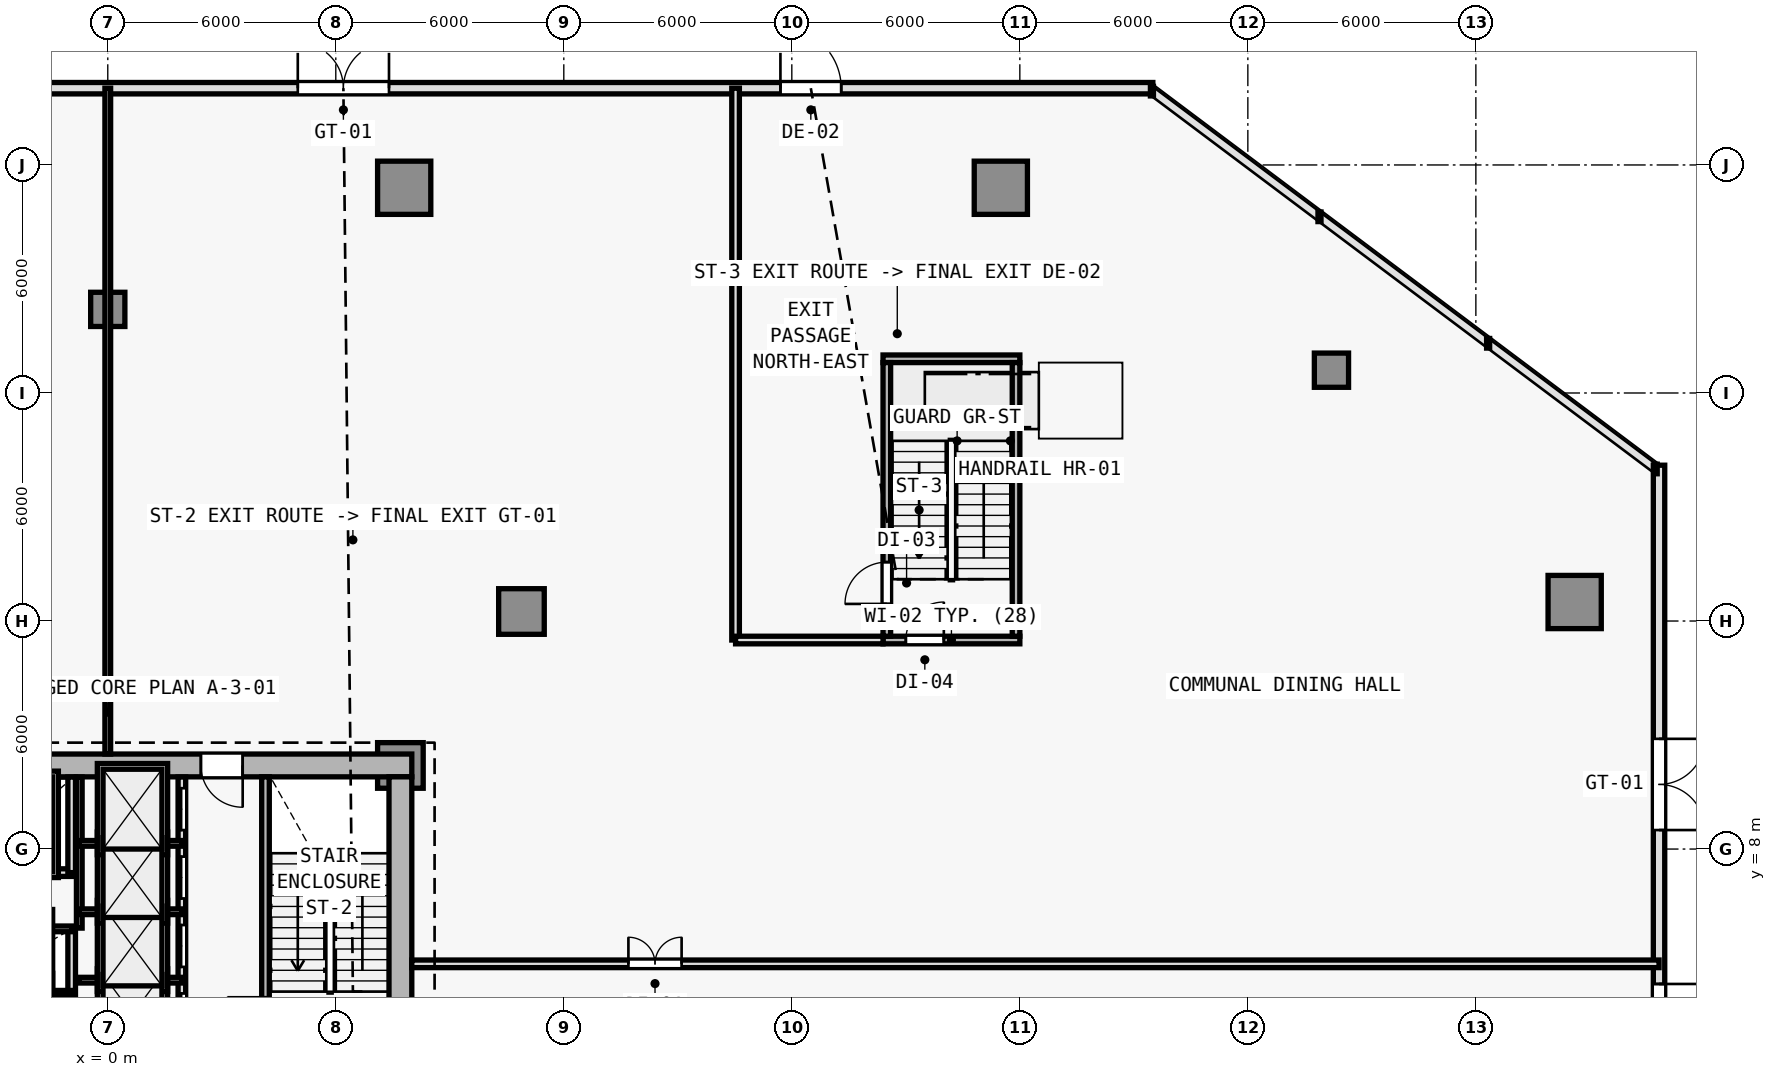
"""IFC4 building model, lengths in metres.
Left out: names, types, materials, properties, quantities, classifications, styles, units other than length and angle.
Written with IfcOpenShell. Run it as: python <this file> out.ifc"""

import sys

from ifc_helpers import new_model, si_unit, direction, frame, frame_2d, origin, origin_2d, place, context, subcontext, project, spatial, rectangle, extrude, element, fill, save


model = new_model("IFC4")
c1 = context("Model", 3, precision=1e-05, world=origin(), true_north=direction((0.0, 1.0)))
c2 = subcontext(c1, "Body", "Model", "MODEL_VIEW")
j1 = project(units=[si_unit("LENGTHUNIT", "METRE"), si_unit("PLANEANGLEUNIT", "RADIAN")], contexts=[c1])
p1 = place(None, origin())
s1 = spatial("IfcSite", under=j1, at=p1, CompositionType="ELEMENT")
p2 = place(p1, origin())
s2 = spatial("IfcBuilding", under=s1, at=p2, CompositionType="ELEMENT")
p3 = place(p2, origin())
s3 = spatial("IfcBuildingStorey", under=s2, at=p3, CompositionType="ELEMENT", Elevation=0.0)
p4 = place(p3, frame((7.7, 10.2, 0.0), z_axis=(0.0, 0.0, 1.0), x_axis=(1.0, 0.0, 0.0)))
e1 = element("IfcColumn", 1, at=p4, inside=s3, PredefinedType="COLUMN", context=c2, shape_type="SweptSolid", body=[
    extrude(rectangle(XDim=1.2, YDim=1.2, at=origin_2d()), origin(), (0.0, 0.0, 1.0), 5.0),
])
for number, where, z_axis, x_axis in (
    (2, (38.6, 14.5, 0.0), (0.0, 0.0, 1.0), (1.0, 0.0, 0.0)),
    (3, (23.5, 25.4, 0.0), (0.0, 0.0, 1.0), (1.0, 0.0, 0.0)),
    (4, (7.8, 25.4, 0.0), (0.0, 0.0, 1.0), (1.0, 0.0, 0.0)),
):
    element("IfcColumn", number, at=place(p3, frame(where, z_axis=z_axis, x_axis=x_axis)), inside=s3, PredefinedType="COLUMN", context=c2, shape_type="SweptSolid", body=[
        extrude(rectangle(XDim=1.4, YDim=1.4, at=origin_2d()), origin(), (0.0, 0.0, 1.0), 5.0),
    ])
p5 = place(p3, frame((10.885, 14.25, 0.0), z_axis=(0.0, 0.0, 1.0), x_axis=(1.0, 0.0, 0.0)))
e5 = element("IfcColumn", 5, at=p5, inside=s3, PredefinedType="COLUMN", context=c2, shape_type="SweptSolid", body=[
    extrude(rectangle(XDim=1.2, YDim=1.2, at=origin_2d()), origin(), (0.0, 0.0, 1.0), 5.0),
])
for number, where, z_axis, x_axis in (
    (6, (32.2, 20.6, 0.0), (0.0, 0.0, 1.0), (1.0, 0.0, 0.0)),
    (7, (0.0, 22.2, 0.0), (0.0, 0.0, 1.0), (1.0, 0.0, 0.0)),
):
    element("IfcColumn", number, at=place(p3, frame(where, z_axis=z_axis, x_axis=x_axis)), inside=s3, PredefinedType="COLUMN", context=c2, shape_type="SweptSolid", body=[
        extrude(rectangle(XDim=0.9, YDim=0.9, at=origin_2d()), origin(), (0.0, 0.0, 1.0), 5.0),
    ])
p6 = place(p3, frame((40.82, 18.1, 0.0), z_axis=(0.0, 0.0, 1.0), x_axis=(0.0, -1.0, 0.0)))
e8 = element("IfcWall", 8, at=p6, inside=s3, PredefinedType="SOLIDWALL", context=c2, shape_type="SweptSolid", body=[
    extrude(rectangle(XDim=39.8, YDim=0.3, at=frame_2d((19.9, 0.0))), origin(), (0.0, 0.0, 1.0), 4.72),
])
p7 = place(p6, frame((25.2, 0.0, 0.0)))
e9 = element("IfcOpeningElement", 9, at=p7, cuts=e8, PredefinedType="OPENING", context=c2, shape_type="SweptSolid", body=[
    extrude(rectangle(XDim=2.4, YDim=2.4, at=frame_2d((1.2, 1.2))), frame((0.0, 0.16, 0.0), z_axis=(0.0, -1.0, 0.0), x_axis=(1.0, 0.0, 0.0)), (0.0, 0.0, 1.0), 0.32),
])
p8 = place(p6, frame((13.65, 0.0, 0.0)))
e10 = element("IfcOpeningElement", 10, at=p8, cuts=e8, PredefinedType="OPENING", context=c2, shape_type="SweptSolid", body=[
    extrude(rectangle(XDim=1.6, YDim=2.3, at=frame_2d((0.8, 1.15))), frame((0.0, 0.16, 0.0), z_axis=(0.0, -1.0, 0.0), x_axis=(1.0, 0.0, 0.0)), (0.0, 0.0, 1.0), 0.32),
])
p9 = place(p6, frame((7.2, 0.0, 0.0)))
e11 = element("IfcOpeningElement", 11, at=p9, cuts=e8, PredefinedType="OPENING", context=c2, shape_type="SweptSolid", body=[
    extrude(rectangle(XDim=2.4, YDim=2.4, at=frame_2d((1.2, 1.2))), frame((0.0, 0.16, 0.0), z_axis=(0.0, -1.0, 0.0), x_axis=(1.0, 0.0, 0.0)), (0.0, 0.0, 1.0), 0.32),
])
p10 = place(p3, frame((-27.5, 28.02, 0.0), z_axis=(0.0, 0.0, 1.0), x_axis=(1.0, 0.0, 0.0)))
e12 = element("IfcWall", 12, at=p10, inside=s3, PredefinedType="SOLIDWALL", context=c2, shape_type="SweptSolid", body=[
    extrude(rectangle(XDim=55.0, YDim=0.3, at=frame_2d((27.5, 0.0))), origin(), (0.0, 0.0, 1.0), 4.72),
])
p11 = place(p10, frame((45.2, 0.0, 0.0)))
e13 = element("IfcOpeningElement", 13, at=p11, cuts=e12, PredefinedType="OPENING", context=c2, shape_type="SweptSolid", body=[
    extrude(rectangle(XDim=1.6, YDim=2.3, at=frame_2d((0.8, 1.15))), frame((0.0, 0.16, 0.0), z_axis=(0.0, -1.0, 0.0), x_axis=(1.0, 0.0, 0.0)), (0.0, 0.0, 1.0), 0.32),
])
p12 = place(p10, frame((32.5, 0.0, 0.0)))
e14 = element("IfcOpeningElement", 14, at=p12, cuts=e12, PredefinedType="OPENING", context=c2, shape_type="SweptSolid", body=[
    extrude(rectangle(XDim=2.4, YDim=2.4, at=frame_2d((1.2, 1.2))), frame((0.0, 0.16, 0.0), z_axis=(0.0, -1.0, 0.0), x_axis=(1.0, 0.0, 0.0)), (0.0, 0.0, 1.0), 0.32),
])
p13 = place(p10, frame((20.7, 0.0, 0.0)))
e15 = element("IfcOpeningElement", 15, at=p13, cuts=e12, PredefinedType="OPENING", context=c2, shape_type="SweptSolid", body=[
    extrude(rectangle(XDim=1.6, YDim=2.3, at=frame_2d((0.8, 1.15))), frame((0.0, 0.16, 0.0), z_axis=(0.0, -1.0, 0.0), x_axis=(1.0, 0.0, 0.0)), (0.0, 0.0, 1.0), 0.32),
])
p14 = place(p3, frame((8.0, 10.2, 0.0), z_axis=(0.0, 0.0, 1.0), x_axis=(-1.0, 0.0, 0.0)))
e16 = element("IfcWall", 16, at=p14, inside=s3, PredefinedType="SHEAR", context=c2, shape_type="SweptSolid", body=[
    extrude(rectangle(XDim=16.0, YDim=0.6, at=frame_2d((8.0, 0.0))), origin(), (0.0, 0.0, 1.0), 4.72),
])
p15 = place(p14, frame((4.45, 0.0, 0.0)))
e17 = element("IfcOpeningElement", 17, at=p15, cuts=e16, PredefinedType="OPENING", context=c2, shape_type="SweptSolid", body=[
    extrude(rectangle(XDim=1.1, YDim=2.15, at=frame_2d((0.55, 1.075))), frame((0.0, 0.31, 0.0), z_axis=(0.0, -1.0, 0.0), x_axis=(1.0, 0.0, 0.0)), (0.0, 0.0, 1.0), 0.62),
])
p16 = place(p3, frame((7.7, 9.9, 0.0), z_axis=(0.0, 0.0, 1.0), x_axis=(0.0, -1.0, 0.0)))
e18 = element("IfcWall", 18, at=p16, inside=s3, PredefinedType="SHEAR", context=c2, shape_type="SweptSolid", body=[
    extrude(rectangle(XDim=19.0, YDim=0.6, at=frame_2d((9.5, 0.0))), origin(), (0.0, 0.0, 1.0), 4.72),
])
p17 = place(p16, frame((5.95, 0.0, 0.0)))
e19 = element("IfcOpeningElement", 19, at=p17, cuts=e18, PredefinedType="OPENING", context=c2, shape_type="SweptSolid", body=[
    extrude(rectangle(XDim=1.1, YDim=2.15, at=frame_2d((0.55, 1.075))), frame((0.0, 0.31, 0.0), z_axis=(0.0, -1.0, 0.0), x_axis=(1.0, 0.0, 0.0)), (0.0, 0.0, 1.0), 0.62),
])
p18 = place(p3, frame((4.15, 2.75, 0.0), z_axis=(0.0, 0.0, 1.0), x_axis=(0.0, 1.0, 0.0)))
e20 = element("IfcWall", 20, at=p18, inside=s3, PredefinedType="SOLIDWALL", context=c2, shape_type="SweptSolid", body=[
    extrude(rectangle(XDim=7.15, YDim=0.2, at=frame_2d((3.575, 0.0))), origin(), (0.0, 0.0, 1.0), 4.72),
])
p19 = place(p18, frame((0.35, 0.0, 0.0)))
e21 = element("IfcOpeningElement", 21, at=p19, cuts=e20, PredefinedType="OPENING", context=c2, shape_type="SweptSolid", body=[
    extrude(rectangle(XDim=1.0, YDim=2.15, at=frame_2d((0.5, 1.075))), frame((0.0, 0.11, 0.0), z_axis=(0.0, -1.0, 0.0), x_axis=(1.0, 0.0, 0.0)), (0.0, 0.0, 1.0), 0.22),
])
p20 = place(p3, frame((-0.95, 2.65, 0.0), z_axis=(0.0, 0.0, 1.0), x_axis=(0.0, 1.0, 0.0)))
e22 = element("IfcWall", 22, at=p20, inside=s3, PredefinedType="SOLIDWALL", context=c2, shape_type="SweptSolid", body=[
    extrude(rectangle(XDim=3.27, YDim=0.2, at=frame_2d((1.635, 0.0))), origin(), (0.0, 0.0, 1.0), 4.72),
])
p21 = place(p3, frame((-3.85, 4.22, 0.0), z_axis=(0.0, 0.0, 1.0), x_axis=(1.0, 0.0, 0.0)))
e23 = element("IfcWall", 23, at=p21, inside=s3, PredefinedType="PARTITIONING", context=c2, shape_type="SweptSolid", body=[
    extrude(rectangle(XDim=2.9, YDim=0.12, at=frame_2d((1.45, 0.0))), origin(), (0.0, 0.0, 1.0), 4.72),
])
p22 = place(p3, frame((-3.85, 5.9, 0.0), z_axis=(0.0, 0.0, 1.0), x_axis=(1.0, 0.0, 0.0)))
e24 = element("IfcWall", 24, at=p22, inside=s3, PredefinedType="PARTITIONING", context=c2, shape_type="SweptSolid", body=[
    extrude(rectangle(XDim=2.9, YDim=0.15, at=frame_2d((1.45, 0.0))), origin(), (0.0, 0.0, 1.0), 4.72),
])
p23 = place(p3, frame((-3.85, 7.38, 0.0), z_axis=(0.0, 0.0, 1.0), x_axis=(1.0, 0.0, 0.0)))
e25 = element("IfcWall", 25, at=p23, inside=s3, PredefinedType="SOLIDWALL", context=c2, shape_type="SweptSolid", body=[
    extrude(rectangle(XDim=2.9, YDim=0.2, at=frame_2d((1.45, 0.0))), origin(), (0.0, 0.0, 1.0), 4.72),
])
p24 = place(p23, frame((0.85, 0.0, 0.0)))
e26 = element("IfcOpeningElement", 26, at=p24, cuts=e25, PredefinedType="OPENING", context=c2, shape_type="SweptSolid", body=[
    extrude(rectangle(XDim=1.2, YDim=2.2, at=frame_2d((0.6, 1.1))), frame((0.0, 0.11, 0.0), z_axis=(0.0, -1.0, 0.0), x_axis=(1.0, 0.0, 0.0)), (0.0, 0.0, 1.0), 0.22),
])
p25 = place(p3, frame((-0.95, 7.38, 0.0), z_axis=(0.0, 0.0, 1.0), x_axis=(0.0, 1.0, 0.0)))
e27 = element("IfcWall", 27, at=p25, inside=s3, PredefinedType="SOLIDWALL", context=c2, shape_type="SweptSolid", body=[
    extrude(rectangle(XDim=2.515, YDim=0.2, at=frame_2d((1.258, 0.0))), origin(), (0.0, 0.0, 1.0), 4.72),
])
p26 = place(p3, frame((1.95, 2.65, 0.0), z_axis=(0.0, 0.0, 1.0), x_axis=(0.0, 1.0, 0.0)))
e28 = element("IfcWall", 28, at=p26, inside=s3, PredefinedType="SOLIDWALL", context=c2, shape_type="SweptSolid", body=[
    extrude(rectangle(XDim=7.245, YDim=0.2, at=frame_2d((3.623, 0.0))), origin(), (0.0, 0.0, 1.0), 4.72),
])
p27 = place(p26, frame((0.45, 0.0, 0.0)))
e29 = element("IfcOpeningElement", 29, at=p27, cuts=e28, PredefinedType="OPENING", context=c2, shape_type="SweptSolid", body=[
    extrude(rectangle(XDim=1.1, YDim=2.15, at=frame_2d((0.55, 1.075))), frame((0.0, 0.11, 0.0), z_axis=(0.0, -1.0, 0.0), x_axis=(1.0, 0.0, 0.0)), (0.0, 0.0, 1.0), 0.22),
])
p28 = place(p26, frame((2.25, 0.0, 0.0)))
e30 = element("IfcOpeningElement", 30, at=p28, cuts=e28, PredefinedType="OPENING", context=c2, shape_type="SweptSolid", body=[
    extrude(rectangle(XDim=1.1, YDim=2.15, at=frame_2d((0.55, 1.075))), frame((0.0, 0.11, 0.0), z_axis=(0.0, -1.0, 0.0), x_axis=(1.0, 0.0, 0.0)), (0.0, 0.0, 1.0), 0.22),
])
p29 = place(p26, frame((4.05, 0.0, 0.0)))
e31 = element("IfcOpeningElement", 31, at=p29, cuts=e28, PredefinedType="OPENING", context=c2, shape_type="SweptSolid", body=[
    extrude(rectangle(XDim=1.1, YDim=2.15, at=frame_2d((0.55, 1.075))), frame((0.0, 0.11, 0.0), z_axis=(0.0, -1.0, 0.0), x_axis=(1.0, 0.0, 0.0)), (0.0, 0.0, 1.0), 0.22),
])
p30 = place(p26, frame((5.85, 0.0, 0.0)))
e32 = element("IfcOpeningElement", 32, at=p30, cuts=e28, PredefinedType="OPENING", context=c2, shape_type="SweptSolid", body=[
    extrude(rectangle(XDim=1.1, YDim=2.15, at=frame_2d((0.55, 1.075))), frame((0.0, 0.11, 0.0), z_axis=(0.0, -1.0, 0.0), x_axis=(1.0, 0.0, 0.0)), (0.0, 0.0, 1.0), 0.22),
])
p31 = place(p3, frame((-0.75, 5.92, 0.0), z_axis=(0.0, 0.0, 1.0), x_axis=(0.0, 1.0, 0.0)))
e33 = element("IfcWall", 33, at=p31, inside=s3, PredefinedType="PARTITIONING", context=c2, shape_type="SweptSolid", body=[
    extrude(rectangle(XDim=3.975, YDim=0.15, at=frame_2d((1.988, 0.0))), origin(), (0.0, 0.0, 1.0), 4.72),
])
for number, where, z_axis, x_axis in (
    (34, (-0.75, 4.55, 0.0), (0.0, 0.0, 1.0), (1.0, 0.0, 0.0)),
    (35, (-0.75, 6.35, 0.0), (0.0, 0.0, 1.0), (1.0, 0.0, 0.0)),
    (36, (-0.75, 8.15, 0.0), (0.0, 0.0, 1.0), (1.0, 0.0, 0.0)),
):
    element("IfcWall", number, at=place(p3, frame(where, z_axis=z_axis, x_axis=x_axis)), inside=s3, PredefinedType="PARTITIONING", context=c2, shape_type="SweptSolid", body=[
        extrude(rectangle(XDim=2.7, YDim=0.15, at=frame_2d((1.35, 0.0))), origin(), (0.0, 0.0, 1.0), 4.72),
    ])
p32 = place(p3, frame((20.4, 13.5, 0.0), z_axis=(0.0, 0.0, 1.0), x_axis=(1.0, 0.0, 0.0)))
e37 = element("IfcWall", 37, at=p32, inside=s3, PredefinedType="SOLIDWALL", context=c2, shape_type="SweptSolid", body=[
    extrude(rectangle(XDim=3.6, YDim=0.2, at=frame_2d((1.8, 0.0))), origin(), (0.0, 0.0, 1.0), 4.72),
])
p33 = place(p32, frame((0.6, 0.0, 0.0)))
e38 = element("IfcOpeningElement", 38, at=p33, cuts=e37, PredefinedType="OPENING", context=c2, shape_type="SweptSolid", body=[
    extrude(rectangle(XDim=1.0, YDim=2.15, at=frame_2d((0.5, 1.075))), frame((0.0, 0.11, 0.0), z_axis=(0.0, -1.0, 0.0), x_axis=(1.0, 0.0, 0.0)), (0.0, 0.0, 1.0), 0.22),
])
p34 = place(p3, frame((20.4, 20.9, 0.0), z_axis=(0.0, 0.0, 1.0), x_axis=(1.0, 0.0, 0.0)))
e39 = element("IfcWall", 39, at=p34, inside=s3, PredefinedType="SOLIDWALL", context=c2, shape_type="SweptSolid", body=[
    extrude(rectangle(XDim=3.6, YDim=0.2, at=frame_2d((1.8, 0.0))), origin(), (0.0, 0.0, 1.0), 4.72),
])
p35 = place(p3, frame((20.5, 13.6, 0.0), z_axis=(0.0, 0.0, 1.0), x_axis=(0.0, 1.0, 0.0)))
e40 = element("IfcWall", 40, at=p35, inside=s3, PredefinedType="SOLIDWALL", context=c2, shape_type="SweptSolid", body=[
    extrude(rectangle(XDim=7.2, YDim=0.2, at=frame_2d((3.6, 0.0))), origin(), (0.0, 0.0, 1.0), 4.72),
])
p36 = place(p35, frame((0.85, 0.0, 0.0)))
e41 = element("IfcOpeningElement", 41, at=p36, cuts=e40, PredefinedType="OPENING", context=c2, shape_type="SweptSolid", body=[
    extrude(rectangle(XDim=1.1, YDim=2.15, at=frame_2d((0.55, 1.075))), frame((0.0, 0.11, 0.0), z_axis=(0.0, -1.0, 0.0), x_axis=(1.0, 0.0, 0.0)), (0.0, 0.0, 1.0), 0.22),
])
p37 = place(p3, frame((23.9, 13.6, 0.0), z_axis=(0.0, 0.0, 1.0), x_axis=(0.0, 1.0, 0.0)))
e42 = element("IfcWall", 42, at=p37, inside=s3, PredefinedType="SOLIDWALL", context=c2, shape_type="SweptSolid", body=[
    extrude(rectangle(XDim=7.2, YDim=0.2, at=frame_2d((3.6, 0.0))), origin(), (0.0, 0.0, 1.0), 4.72),
])
p38 = place(p3, frame((8.0, 4.98, 0.0), z_axis=(0.0, 0.0, 1.0), x_axis=(1.0, 0.0, 0.0)))
e43 = element("IfcWall", 43, at=p38, inside=s3, PredefinedType="SOLIDWALL", context=c2, shape_type="SweptSolid", body=[
    extrude(rectangle(XDim=32.82, YDim=0.2, at=frame_2d((16.41, 0.0))), origin(), (0.0, 0.0, 1.0), 4.105),
])
p39 = place(p38, frame((5.7, 0.0, 0.0)))
e44 = element("IfcOpeningElement", 44, at=p39, cuts=e43, PredefinedType="OPENING", context=c2, shape_type="SweptSolid", body=[
    extrude(rectangle(XDim=1.4, YDim=2.2, at=frame_2d((0.7, 1.1))), frame((0.0, 0.11, 0.0), z_axis=(0.0, -1.0, 0.0), x_axis=(1.0, 0.0, 0.0)), (0.0, 0.0, 1.0), 0.22),
])
p40 = place(p3, frame((16.52, 13.5, 0.0), z_axis=(0.0, 0.0, 1.0), x_axis=(0.0, 1.0, 0.0)))
e45 = element("IfcWall", 45, at=p40, inside=s3, PredefinedType="SOLIDWALL", context=c2, shape_type="SweptSolid", body=[
    extrude(rectangle(XDim=14.52, YDim=0.2, at=frame_2d((7.26, 0.0))), origin(), (0.0, 0.0, 1.0), 3.881),
])
p41 = place(p3, frame((16.52, 13.5, 0.0), z_axis=(0.0, 0.0, 1.0), x_axis=(1.0, 0.0, 0.0)))
e46 = element("IfcWall", 46, at=p41, inside=s3, PredefinedType="SOLIDWALL", context=c2, shape_type="SweptSolid", body=[
    extrude(rectangle(XDim=3.88, YDim=0.2, at=frame_2d((1.94, 0.0))), origin(), (0.0, 0.0, 1.0), 4.72),
])
p42 = place(p3, frame((0.0, 10.5, 0.0), z_axis=(0.0, 0.0, 1.0), x_axis=(0.0, 1.0, 0.0)))
e47 = element("IfcWall", 47, at=p42, inside=s3, PredefinedType="PARTITIONING", context=c2, shape_type="SweptSolid", body=[
    extrude(rectangle(XDim=17.52, YDim=0.15, at=frame_2d((8.76, 0.0))), origin(), (0.0, 0.0, 1.0), 3.881),
])
p43 = place(p8, origin())
e48 = element("IfcDoor", 48, at=p43, inside=s3, OperationType="SINGLE_SWING_LEFT", PredefinedType="DOOR", context=c2, shape_type="SweptSolid", body=[
    extrude(rectangle(XDim=1.6, YDim=2.3, at=frame_2d((0.8, 1.15))), frame((0.0, 0.025, 0.0), z_axis=(0.0, -1.0, 0.0), x_axis=(1.0, 0.0, 0.0)), (0.0, 0.0, 1.0), 0.05),
])
fill(e10, e48)
p44 = place(p9, origin())
e49 = element("IfcDoor", 49, at=p44, inside=s3, OperationType="DOUBLE_DOOR_SINGLE_SWING", PredefinedType="GATE", context=c2, shape_type="SweptSolid", body=[
    extrude(rectangle(XDim=2.4, YDim=2.4, at=frame_2d((1.2, 1.2))), frame((0.0, 0.025, 0.0), z_axis=(0.0, -1.0, 0.0), x_axis=(1.0, 0.0, 0.0)), (0.0, 0.0, 1.0), 0.05),
])
fill(e11, e49)
p45 = place(p11, origin())
e50 = element("IfcDoor", 50, at=p45, inside=s3, OperationType="SINGLE_SWING_LEFT", PredefinedType="DOOR", context=c2, shape_type="SweptSolid", body=[
    extrude(rectangle(XDim=1.6, YDim=2.3, at=frame_2d((0.8, 1.15))), frame((0.0, 0.025, 0.0), z_axis=(0.0, -1.0, 0.0), x_axis=(1.0, 0.0, 0.0)), (0.0, 0.0, 1.0), 0.05),
])
fill(e13, e50)
p46 = place(p12, origin())
e51 = element("IfcDoor", 51, at=p46, inside=s3, OperationType="DOUBLE_DOOR_SINGLE_SWING", PredefinedType="GATE", context=c2, shape_type="SweptSolid", body=[
    extrude(rectangle(XDim=2.4, YDim=2.4, at=frame_2d((1.2, 1.2))), frame((0.0, 0.025, 0.0), z_axis=(0.0, -1.0, 0.0), x_axis=(1.0, 0.0, 0.0)), (0.0, 0.0, 1.0), 0.05),
])
fill(e14, e51)
p47 = place(p15, origin())
e52 = element("IfcDoor", 52, at=p47, inside=s3, OperationType="SINGLE_SWING_LEFT", PredefinedType="DOOR", context=c2, shape_type="SweptSolid", body=[
    extrude(rectangle(XDim=1.1, YDim=2.15, at=frame_2d((0.55, 1.075))), frame((0.0, 0.025, 0.0), z_axis=(0.0, -1.0, 0.0), x_axis=(1.0, 0.0, 0.0)), (0.0, 0.0, 1.0), 0.05),
])
fill(e17, e52)
p48 = place(p27, origin())
e53 = element("IfcDoor", 53, at=p48, inside=s3, OperationType="DOUBLE_DOOR_SLIDING", PredefinedType="DOOR", context=c2, shape_type="SweptSolid", body=[
    extrude(rectangle(XDim=1.1, YDim=2.15, at=frame_2d((0.55, 1.075))), frame((0.0, 0.025, 0.0), z_axis=(0.0, -1.0, 0.0), x_axis=(1.0, 0.0, 0.0)), (0.0, 0.0, 1.0), 0.05),
])
fill(e29, e53)
p49 = place(p28, origin())
e54 = element("IfcDoor", 54, at=p49, inside=s3, OperationType="DOUBLE_DOOR_SLIDING", PredefinedType="DOOR", context=c2, shape_type="SweptSolid", body=[
    extrude(rectangle(XDim=1.1, YDim=2.15, at=frame_2d((0.55, 1.075))), frame((0.0, 0.025, 0.0), z_axis=(0.0, -1.0, 0.0), x_axis=(1.0, 0.0, 0.0)), (0.0, 0.0, 1.0), 0.05),
])
fill(e30, e54)
p50 = place(p29, origin())
e55 = element("IfcDoor", 55, at=p50, inside=s3, OperationType="DOUBLE_DOOR_SLIDING", PredefinedType="DOOR", context=c2, shape_type="SweptSolid", body=[
    extrude(rectangle(XDim=1.1, YDim=2.15, at=frame_2d((0.55, 1.075))), frame((0.0, 0.025, 0.0), z_axis=(0.0, -1.0, 0.0), x_axis=(1.0, 0.0, 0.0)), (0.0, 0.0, 1.0), 0.05),
])
fill(e31, e55)
p51 = place(p30, origin())
e56 = element("IfcDoor", 56, at=p51, inside=s3, OperationType="DOUBLE_DOOR_SLIDING", PredefinedType="DOOR", context=c2, shape_type="SweptSolid", body=[
    extrude(rectangle(XDim=1.1, YDim=2.15, at=frame_2d((0.55, 1.075))), frame((0.0, 0.025, 0.0), z_axis=(0.0, -1.0, 0.0), x_axis=(1.0, 0.0, 0.0)), (0.0, 0.0, 1.0), 0.05),
])
fill(e32, e56)
p52 = place(p33, origin())
e57 = element("IfcDoor", 57, at=p52, inside=s3, OperationType="SINGLE_SWING_RIGHT", PredefinedType="DOOR", context=c2, shape_type="SweptSolid", body=[
    extrude(rectangle(XDim=1.0, YDim=2.15, at=frame_2d((0.5, 1.075))), frame((0.0, 0.025, 0.0), z_axis=(0.0, -1.0, 0.0), x_axis=(1.0, 0.0, 0.0)), (0.0, 0.0, 1.0), 0.05),
])
fill(e38, e57)
p53 = place(p36, origin())
e58 = element("IfcDoor", 58, at=p53, inside=s3, OperationType="SINGLE_SWING_LEFT", PredefinedType="DOOR", context=c2, shape_type="SweptSolid", body=[
    extrude(rectangle(XDim=1.1, YDim=2.15, at=frame_2d((0.55, 1.075))), frame((0.0, 0.025, 0.0), z_axis=(0.0, -1.0, 0.0), x_axis=(1.0, 0.0, 0.0)), (0.0, 0.0, 1.0), 0.05),
])
fill(e41, e58)
p54 = place(p39, origin())
e59 = element("IfcDoor", 59, at=p54, inside=s3, OperationType="DOUBLE_DOOR_SINGLE_SWING", PredefinedType="DOOR", context=c2, shape_type="SweptSolid", body=[
    extrude(rectangle(XDim=1.4, YDim=2.2, at=frame_2d((0.7, 1.1))), frame((0.0, 0.025, 0.0), z_axis=(0.0, -1.0, 0.0), x_axis=(1.0, 0.0, 0.0)), (0.0, 0.0, 1.0), 0.05),
])
fill(e44, e59)
save(model, sys.argv[1])
